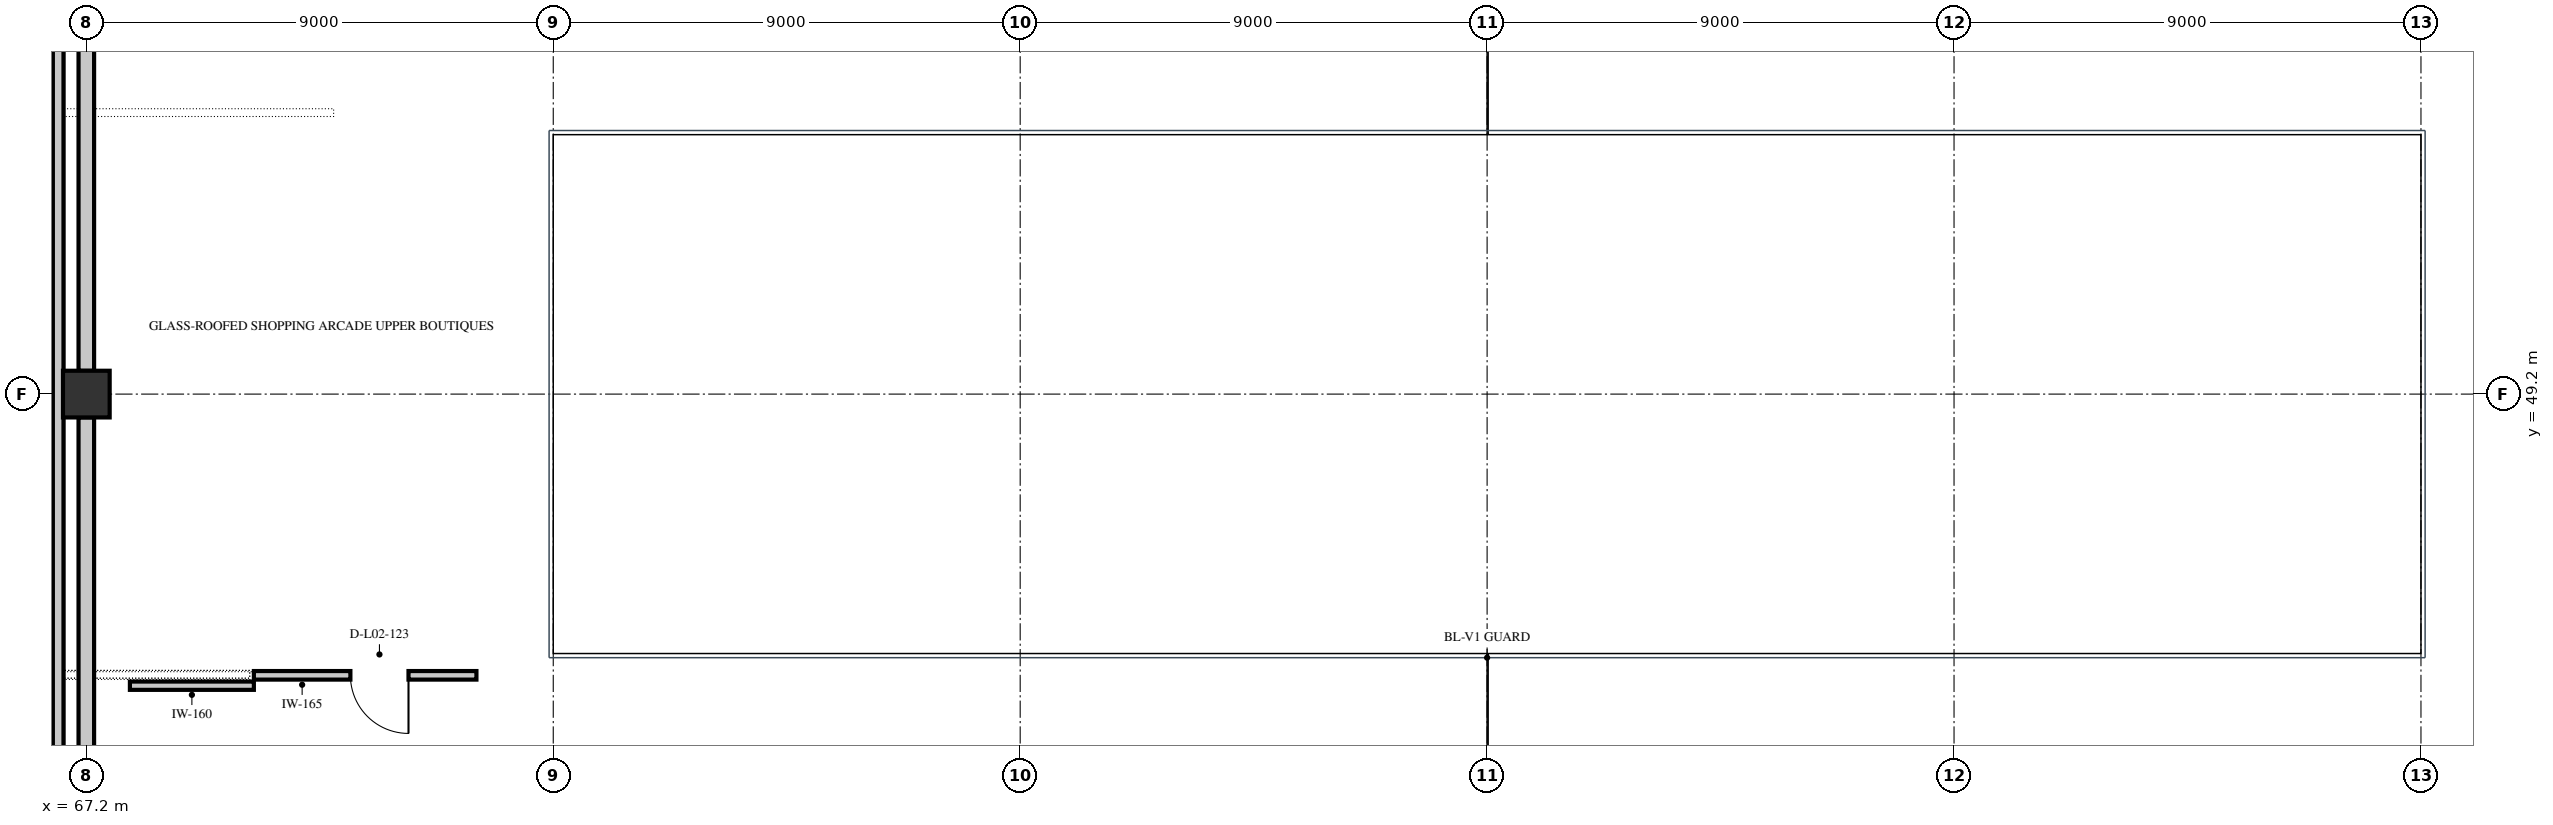
"""IFC4 building model, lengths in metres.
Left out: names, types, materials, properties, quantities, classifications, styles, units other than length and angle.
Written with IfcOpenShell. Run it as: python <this file> out.ifc"""

import sys

from ifc_helpers import new_model, si_unit, direction, frame, frame_2d, origin, origin_2d, place, context, subcontext, project, spatial, rectangle, extrude, element, fill, save


model = new_model("IFC4")
c1 = context("Model", 3, precision=1e-05, world=origin(), true_north=direction((0.0, 1.0)))
c2 = subcontext(c1, "Body", "Model", "MODEL_VIEW")
j1 = project(units=[si_unit("LENGTHUNIT", "METRE"), si_unit("PLANEANGLEUNIT", "RADIAN")], contexts=[c1])
p1 = place(None, origin())
s1 = spatial("IfcSite", under=j1, at=p1, CompositionType="ELEMENT")
p2 = place(p1, origin())
s2 = spatial("IfcBuilding", under=s1, at=p2, CompositionType="ELEMENT")
p3 = place(p2, frame((0.0, 0.0, 10.2)))
s3 = spatial("IfcBuildingStorey", under=s2, at=p3, CompositionType="ELEMENT", Elevation=10.2)
p4 = place(p3, frame((67.2, 49.2, 0.0), z_axis=(0.0, 0.0, 1.0), x_axis=(1.0, 0.0, 0.0)))
e1 = element("IfcColumn", 1, at=p4, inside=s3, PredefinedType="COLUMN", context=c2, shape_type="SweptSolid", body=[
    extrude(rectangle(XDim=0.9, YDim=0.9, at=origin_2d()), origin(), (0.0, 0.0, 1.0), 4.8),
])
p5 = place(p3, frame((67.2, 38.798, 0.0), z_axis=(0.0, 0.0, 1.0), x_axis=(0.0, 1.0, 0.0)))
e2 = element("IfcWall", 2, at=p5, inside=s3, PredefinedType="SOLIDWALL", context=c2, shape_type="SweptSolid", body=[
    extrude(rectangle(XDim=9.954, YDim=0.3, at=frame_2d((4.977, 0.0))), origin(), (0.0, 0.0, 1.0), 3.39),
])
p6 = place(p3, frame((67.2, 49.648, 0.0), z_axis=(0.0, 0.0, 1.0), x_axis=(0.0, 1.0, 0.0)))
e3 = element("IfcWall", 3, at=p6, inside=s3, PredefinedType="SOLIDWALL", context=c2, shape_type="SweptSolid", body=[
    extrude(rectangle(XDim=9.954, YDim=0.3, at=frame_2d((4.977, 0.0))), origin(), (0.0, 0.0, 1.0), 3.39),
])
p7 = place(p3, frame((66.657, 58.155, 0.0), z_axis=(0.0, 0.0, 1.0), x_axis=(0.0, -1.0, 0.0)))
e4 = element("IfcWall", 4, at=p7, inside=s3, PredefinedType="PARAPET", context=c2, shape_type="SweptSolid", body=[
    extrude(rectangle(XDim=53.775, YDim=0.205, at=frame_2d((26.888, 0.0))), origin(), (0.0, 0.0, 1.0), 1.2),
])
p8 = place(p3, frame((74.719, 43.78, 0.0), z_axis=(0.0, 0.0, 1.0), x_axis=(-1.0, 0.0, 0.0)))
e5 = element("IfcWall", 5, at=p8, inside=s3, PredefinedType="PARTITIONING", context=c2, shape_type="SweptSolid", body=[
    extrude(rectangle(XDim=4.29, YDim=0.165, at=frame_2d((2.145, 0.0))), origin(), (0.0, 0.0, 1.0), 4.515),
])
p9 = place(p8, frame((1.309, 0.0, 0.0)))
e6 = element("IfcOpeningElement", 6, at=p9, cuts=e5, PredefinedType="OPENING", context=c2, shape_type="SweptSolid", body=[
    extrude(rectangle(XDim=1.12, YDim=2.18, at=frame_2d((0.56, 1.09))), frame((0.0, 0.094, 0.0), z_axis=(0.0, -1.0, 0.0), x_axis=(1.0, 0.0, 0.0)), (0.0, 0.0, 1.0), 0.189),
])
p10 = place(p3, frame((70.43, 43.58, 0.0), z_axis=(0.0, 0.0, 1.0), x_axis=(-1.0, 0.0, 0.0)))
e7 = element("IfcWall", 7, at=p10, inside=s3, PredefinedType="PARTITIONING", context=c2, shape_type="SweptSolid", body=[
    extrude(rectangle(XDim=2.39, YDim=0.16, at=frame_2d((1.195, 0.0))), origin(), (0.0, 0.0, 1.0), 4.515),
])
p11 = place(p9, origin())
e8 = element("IfcDoor", 8, at=p11, inside=s3, OperationType="SINGLE_SWING_LEFT", PredefinedType="DOOR", context=c2, shape_type="SweptSolid", body=[
    extrude(rectangle(XDim=1.12, YDim=2.18, at=frame_2d((0.56, 1.09))), frame((0.0, 0.025, 0.0), z_axis=(0.0, -1.0, 0.0), x_axis=(1.0, 0.0, 0.0)), (0.0, 0.0, 1.0), 0.05),
])
fill(e6, e8)
save(model, sys.argv[1])
